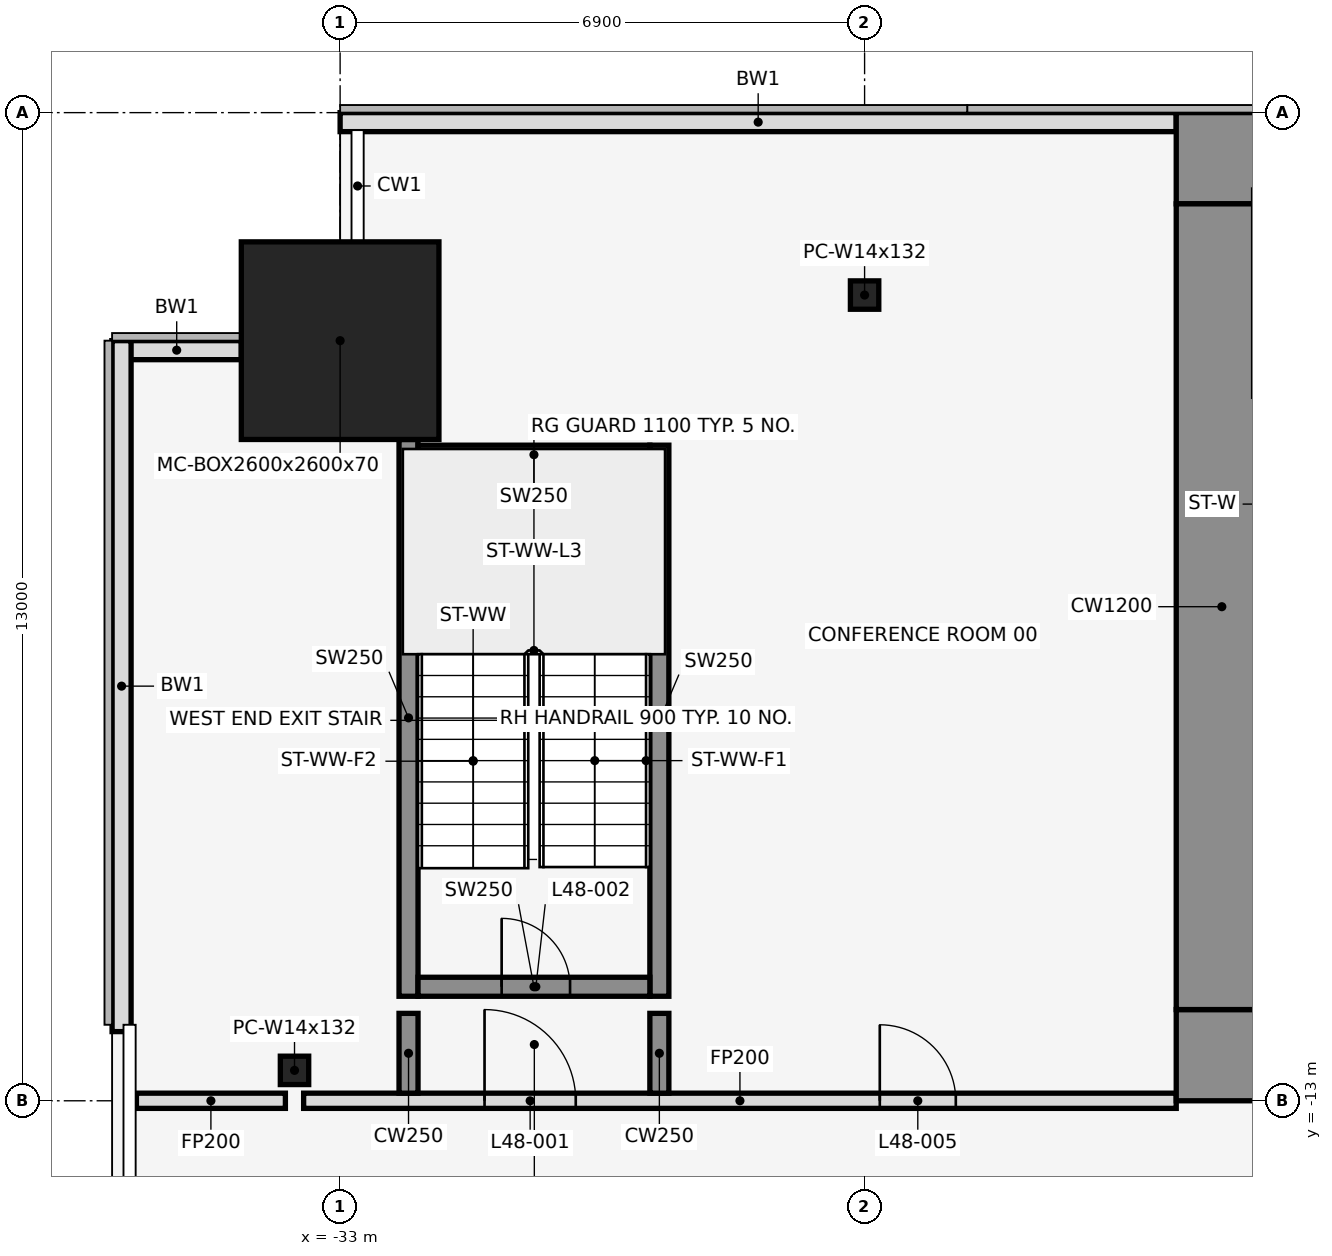
"""IFC4 building model, lengths in metres.
Left out: names, types, materials, properties, quantities, classifications, styles, units other than length and angle.
Written with IfcOpenShell. Run it as: python <this file> out.ifc"""

import sys

from ifc_helpers import new_model, si_unit, direction, frame, frame_2d, origin, origin_2d, place, context, subcontext, project, spatial, rectangle, hollow_rectangle, i_section, extrude, element, fill, save


model = new_model("IFC4")
c1 = context("Model", 3, precision=1e-05, world=origin(), true_north=direction((0.0, 1.0)))
c2 = subcontext(c1, "Body", "Model", "MODEL_VIEW")
j1 = project(units=[si_unit("LENGTHUNIT", "METRE"), si_unit("PLANEANGLEUNIT", "RADIAN")], contexts=[c1])
p1 = place(None, origin())
s1 = spatial("IfcSite", under=j1, at=p1, CompositionType="ELEMENT")
p2 = place(p1, origin())
s2 = spatial("IfcBuilding", under=s1, at=p2, CompositionType="ELEMENT")
p3 = place(p2, frame((0.0, 0.0, 215.5)))
s3 = spatial("IfcBuildingStorey", under=s2, at=p3, CompositionType="ELEMENT", Elevation=215.5)
p4 = place(p3, frame((-33.0, -3.0, 0.0), z_axis=(0.0, 0.0, 1.0), x_axis=(1.0, 0.0, 0.0)))
e1 = element("IfcColumn", 1, at=p4, inside=s3, PredefinedType="COLUMN", context=c2, shape_type="SweptSolid", body=[
    extrude(hollow_rectangle(XDim=2.6, YDim=2.6, WallThickness=0.07, at=origin_2d()), origin(), (0.0, 0.0, 1.0), 4.1),
])
for number, where, z_axis, x_axis in (
    (2, (-26.1, -2.4, 0.0), (0.0, 0.0, 1.0), (1.0, 0.0, 0.0)),
    (3, (-33.6, -12.6, 0.0), (0.0, 0.0, 1.0), (1.0, 0.0, 0.0)),
):
    element("IfcColumn", number, at=place(p3, frame(where, z_axis=z_axis, x_axis=x_axis)), inside=s3, PredefinedType="COLUMN", context=c2, shape_type="SweptSolid", body=[
        extrude(i_section(OverallWidth=0.373, OverallDepth=0.373, WebThickness=0.016, FlangeThickness=0.026, at=origin_2d()), origin(), (0.0, 0.0, 1.0), 4.1),
    ])
p5 = place(p3, frame((-22.0, -0.125, 0.0), z_axis=(0.0, 0.0, 1.0), x_axis=(-1.0, 0.0, 0.0)))
e4 = element("IfcWall", 4, at=p5, inside=s3, PredefinedType="STANDARD", context=c2, shape_type="SweptSolid", body=[
    extrude(rectangle(XDim=11.0, YDim=0.25, at=frame_2d((5.5, 0.0))), origin(), (0.0, 0.0, 1.0), 3.95),
])
p6 = place(p3, frame((-34.3, -3.125, 0.0), z_axis=(0.0, 0.0, 1.0), x_axis=(-1.0, 0.0, 0.0)))
e5 = element("IfcWall", 5, at=p6, inside=s3, PredefinedType="STANDARD", context=c2, shape_type="SweptSolid", body=[
    extrude(rectangle(XDim=1.7, YDim=0.25, at=frame_2d((0.85, 0.0))), origin(), (0.0, 0.0, 1.0), 3.95),
])
p7 = place(p3, frame((-35.875, -3.0, 0.0), z_axis=(0.0, 0.0, 1.0), x_axis=(0.0, -1.0, 0.0)))
e6 = element("IfcWall", 6, at=p7, inside=s3, PredefinedType="STANDARD", context=c2, shape_type="SweptSolid", body=[
    extrude(rectangle(XDim=9.09, YDim=0.25, at=frame_2d((4.545, 0.0))), origin(), (0.0, 0.0, 1.0), 3.95),
])
p8 = place(p3, frame((-32.1, -11.625, 0.0), z_axis=(0.0, 0.0, 1.0), x_axis=(0.0, 1.0, 0.0)))
e7 = element("IfcWall", 7, at=p8, inside=s3, PredefinedType="SHEAR", context=c2, shape_type="SweptSolid", body=[
    extrude(rectangle(XDim=7.325, YDim=0.25, at=frame_2d((3.663, 0.0))), origin(), (0.0, 0.0, 1.0), 4.1),
])
p9 = place(p3, frame((-28.8, -11.625, 0.0), z_axis=(0.0, 0.0, 1.0), x_axis=(0.0, 1.0, 0.0)))
e8 = element("IfcWall", 8, at=p9, inside=s3, PredefinedType="SHEAR", context=c2, shape_type="SweptSolid", body=[
    extrude(rectangle(XDim=7.25, YDim=0.25, at=frame_2d((3.625, 0.0))), origin(), (0.0, 0.0, 1.0), 4.1),
])
p10 = place(p3, frame((-31.975, -11.5, 0.0), z_axis=(0.0, 0.0, 1.0), x_axis=(1.0, 0.0, 0.0)))
e9 = element("IfcWall", 9, at=p10, inside=s3, PredefinedType="SHEAR", context=c2, shape_type="SweptSolid", body=[
    extrude(rectangle(XDim=3.05, YDim=0.25, at=frame_2d((1.525, 0.0))), origin(), (0.0, 0.0, 1.0), 4.1),
])
p11 = place(p10, frame((1.1, 0.0, 0.0)))
e10 = element("IfcOpeningElement", 10, at=p11, cuts=e9, PredefinedType="OPENING", context=c2, shape_type="SweptSolid", body=[
    extrude(rectangle(XDim=0.9, YDim=2.1, at=frame_2d((0.45, 1.05))), frame((0.0, 0.137, 0.0), z_axis=(0.0, -1.0, 0.0), x_axis=(1.0, 0.0, 0.0)), (0.0, 0.0, 1.0), 0.274),
])
p12 = place(p3, frame((-31.975, -4.5, 0.0), z_axis=(0.0, 0.0, 1.0), x_axis=(1.0, 0.0, 0.0)))
e11 = element("IfcWall", 11, at=p12, inside=s3, PredefinedType="SHEAR", context=c2, shape_type="SweptSolid", body=[
    extrude(rectangle(XDim=3.05, YDim=0.25, at=frame_2d((1.525, 0.0))), origin(), (0.0, 0.0, 1.0), 4.1),
])
p13 = place(p3, frame((-35.68, -13.0, 0.0), z_axis=(0.0, 0.0, 1.0), x_axis=(1.0, 0.0, 0.0)))
e12 = element("IfcWall", 12, at=p13, inside=s3, PredefinedType="PARTITIONING", context=c2, shape_type="SweptSolid", body=[
    extrude(rectangle(XDim=1.96, YDim=0.2, at=frame_2d((0.98, 0.0))), origin(), (0.0, 0.0, 1.0), 2.84),
])
p14 = place(p3, frame((-33.48, -13.0, 0.0), z_axis=(0.0, 0.0, 1.0), x_axis=(1.0, 0.0, 0.0)))
e13 = element("IfcWall", 13, at=p14, inside=s3, PredefinedType="PARTITIONING", context=c2, shape_type="SweptSolid", body=[
    extrude(rectangle(XDim=11.48, YDim=0.2, at=frame_2d((5.74, 0.0))), origin(), (0.0, 0.0, 1.0), 2.84),
])
p15 = place(p14, frame((2.38, 0.0, 0.0)))
e14 = element("IfcOpeningElement", 14, at=p15, cuts=e13, PredefinedType="OPENING", context=c2, shape_type="SweptSolid", body=[
    extrude(rectangle(XDim=1.2, YDim=2.1, at=frame_2d((0.6, 1.05))), frame((0.0, 0.112, 0.0), z_axis=(0.0, -1.0, 0.0), x_axis=(1.0, 0.0, 0.0)), (0.0, 0.0, 1.0), 0.224),
])
p16 = place(p14, frame((7.58, 0.0, 0.0)))
e15 = element("IfcOpeningElement", 15, at=p16, cuts=e13, PredefinedType="OPENING", context=c2, shape_type="SweptSolid", body=[
    extrude(rectangle(XDim=1.0, YDim=2.1, at=frame_2d((0.5, 1.05))), frame((0.0, 0.112, 0.0), z_axis=(0.0, -1.0, 0.0), x_axis=(1.0, 0.0, 0.0)), (0.0, 0.0, 1.0), 0.224),
])
for number, where, z_axis, x_axis in (
    (16, (-32.1, -12.9, 0.0), (0.0, 0.0, 1.0), (0.0, 1.0, 0.0)),
    (17, (-28.8, -12.9, 0.0), (0.0, 0.0, 1.0), (0.0, 1.0, 0.0)),
):
    element("IfcWall", number, at=place(p3, frame(where, z_axis=z_axis, x_axis=x_axis)), inside=s3, PredefinedType="SHEAR", context=c2, shape_type="SweptSolid", body=[
        extrude(rectangle(XDim=1.05, YDim=0.25, at=frame_2d((0.525, 0.0))), origin(), (0.0, 0.0, 1.0), 4.1),
    ])
p17 = place(p3, frame((-22.0, -0.6, 0.0), z_axis=(0.0, 0.0, 1.0), x_axis=(1.0, 0.0, 0.0)))
e18 = element("IfcWall", 18, at=p17, inside=s3, PredefinedType="SHEAR", context=c2, shape_type="SweptSolid", body=[
    extrude(rectangle(XDim=44.0, YDim=1.2, at=frame_2d((22.0, 0.0))), origin(), (0.0, 0.0, 1.0), 4.1),
])
p18 = place(p17, frame((18.55, 0.0, 0.0)))
e19 = element("IfcOpeningElement", 19, at=p18, cuts=e18, PredefinedType="OPENING", context=c2, shape_type="SweptSolid", body=[
    extrude(rectangle(XDim=0.9, YDim=2.1, at=frame_2d((0.45, 1.05))), frame((0.0, 0.612, 0.0), z_axis=(0.0, -1.0, 0.0), x_axis=(1.0, 0.0, 0.0)), (0.0, 0.0, 1.0), 1.224),
])
p19 = place(p17, frame((24.55, 0.0, 0.0)))
e20 = element("IfcOpeningElement", 20, at=p19, cuts=e18, PredefinedType="OPENING", context=c2, shape_type="SweptSolid", body=[
    extrude(rectangle(XDim=0.9, YDim=2.1, at=frame_2d((0.45, 1.05))), frame((0.0, 0.612, 0.0), z_axis=(0.0, -1.0, 0.0), x_axis=(1.0, 0.0, 0.0)), (0.0, 0.0, 1.0), 1.224),
])
p20 = place(p3, frame((-22.0, -12.4, 0.0), z_axis=(0.0, 0.0, 1.0), x_axis=(1.0, 0.0, 0.0)))
e21 = element("IfcWall", 21, at=p20, inside=s3, PredefinedType="SHEAR", context=c2, shape_type="SweptSolid", body=[
    extrude(rectangle(XDim=44.0, YDim=1.2, at=frame_2d((22.0, 0.0))), origin(), (0.0, 0.0, 1.0), 4.1),
])
p21 = place(p20, frame((2.2, 0.0, 0.0)))
e22 = element("IfcOpeningElement", 22, at=p21, cuts=e21, PredefinedType="OPENING", context=c2, shape_type="SweptSolid", body=[
    extrude(rectangle(XDim=1.2, YDim=2.1, at=frame_2d((0.6, 1.05))), frame((0.0, 0.612, 0.0), z_axis=(0.0, -1.0, 0.0), x_axis=(1.0, 0.0, 0.0)), (0.0, 0.0, 1.0), 1.224),
])
p22 = place(p20, frame((21.4, 0.0, 0.0)))
e23 = element("IfcOpeningElement", 23, at=p22, cuts=e21, PredefinedType="OPENING", context=c2, shape_type="SweptSolid", body=[
    extrude(rectangle(XDim=1.2, YDim=2.1, at=frame_2d((0.6, 1.05))), frame((0.0, 0.612, 0.0), z_axis=(0.0, -1.0, 0.0), x_axis=(1.0, 0.0, 0.0)), (0.0, 0.0, 1.0), 1.224),
])
p23 = place(p20, frame((40.6, 0.0, 0.0)))
e24 = element("IfcOpeningElement", 24, at=p23, cuts=e21, PredefinedType="OPENING", context=c2, shape_type="SweptSolid", body=[
    extrude(rectangle(XDim=1.2, YDim=2.1, at=frame_2d((0.6, 1.05))), frame((0.0, 0.612, 0.0), z_axis=(0.0, -1.0, 0.0), x_axis=(1.0, 0.0, 0.0)), (0.0, 0.0, 1.0), 1.224),
])
p24 = place(p20, frame((16.0, 0.0, 0.0)))
e25 = element("IfcOpeningElement", 25, at=p24, cuts=e21, PredefinedType="OPENING", context=c2, shape_type="SweptSolid", body=[
    extrude(rectangle(XDim=1.8, YDim=2.1, at=frame_2d((0.9, 1.05))), frame((0.0, 0.612, 0.0), z_axis=(0.0, -1.0, 0.0), x_axis=(1.0, 0.0, 0.0)), (0.0, 0.0, 1.0), 1.224),
])
p25 = place(p20, frame((6.3, 0.0, 0.0)))
e26 = element("IfcOpeningElement", 26, at=p25, cuts=e21, PredefinedType="OPENING", context=c2, shape_type="SweptSolid", body=[
    extrude(rectangle(XDim=1.2, YDim=2.1, at=frame_2d((0.6, 1.05))), frame((0.0, 0.612, 0.0), z_axis=(0.0, -1.0, 0.0), x_axis=(1.0, 0.0, 0.0)), (0.0, 0.0, 1.0), 1.224),
])
p26 = place(p20, frame((26.2, 0.0, 0.0)))
e27 = element("IfcOpeningElement", 27, at=p26, cuts=e21, PredefinedType="OPENING", context=c2, shape_type="SweptSolid", body=[
    extrude(rectangle(XDim=1.8, YDim=2.1, at=frame_2d((0.9, 1.05))), frame((0.0, 0.612, 0.0), z_axis=(0.0, -1.0, 0.0), x_axis=(1.0, 0.0, 0.0)), (0.0, 0.0, 1.0), 1.224),
])
p27 = place(p20, frame((36.5, 0.0, 0.0)))
e28 = element("IfcOpeningElement", 28, at=p27, cuts=e21, PredefinedType="OPENING", context=c2, shape_type="SweptSolid", body=[
    extrude(rectangle(XDim=1.2, YDim=2.1, at=frame_2d((0.6, 1.05))), frame((0.0, 0.612, 0.0), z_axis=(0.0, -1.0, 0.0), x_axis=(1.0, 0.0, 0.0)), (0.0, 0.0, 1.0), 1.224),
])
p28 = place(p3, frame((-21.4, -11.8, 0.0), z_axis=(0.0, 0.0, 1.0), x_axis=(0.0, 1.0, 0.0)))
e29 = element("IfcWall", 29, at=p28, inside=s3, PredefinedType="SHEAR", context=c2, shape_type="SweptSolid", body=[
    extrude(rectangle(XDim=10.6, YDim=1.2, at=frame_2d((5.3, 0.0))), origin(), (0.0, 0.0, 1.0), 4.1),
])
p29 = place(p15, origin())
e30 = element("IfcDoor", 30, at=p29, inside=s3, OperationType="SINGLE_SWING_LEFT", PredefinedType="DOOR", context=c2, shape_type="SweptSolid", body=[
    extrude(rectangle(XDim=1.2, YDim=2.1, at=frame_2d((0.6, 1.05))), frame((0.0, 0.025, 0.0), z_axis=(0.0, -1.0, 0.0), x_axis=(1.0, 0.0, 0.0)), (0.0, 0.0, 1.0), 0.05),
])
fill(e14, e30)
p30 = place(p11, origin())
e31 = element("IfcDoor", 31, at=p30, inside=s3, OperationType="SINGLE_SWING_LEFT", PredefinedType="DOOR", context=c2, shape_type="SweptSolid", body=[
    extrude(rectangle(XDim=0.9, YDim=2.1, at=frame_2d((0.45, 1.05))), frame((0.0, 0.025, 0.0), z_axis=(0.0, -1.0, 0.0), x_axis=(1.0, 0.0, 0.0)), (0.0, 0.0, 1.0), 0.05),
])
fill(e10, e31)
p31 = place(p16, origin())
e32 = element("IfcDoor", 32, at=p31, inside=s3, OperationType="SINGLE_SWING_LEFT", PredefinedType="DOOR", context=c2, shape_type="SweptSolid", body=[
    extrude(rectangle(XDim=1.0, YDim=2.1, at=frame_2d((0.5, 1.05))), frame((0.0, 0.025, 0.0), z_axis=(0.0, -1.0, 0.0), x_axis=(1.0, 0.0, 0.0)), (0.0, 0.0, 1.0), 0.05),
])
fill(e15, e32)
save(model, sys.argv[1])
